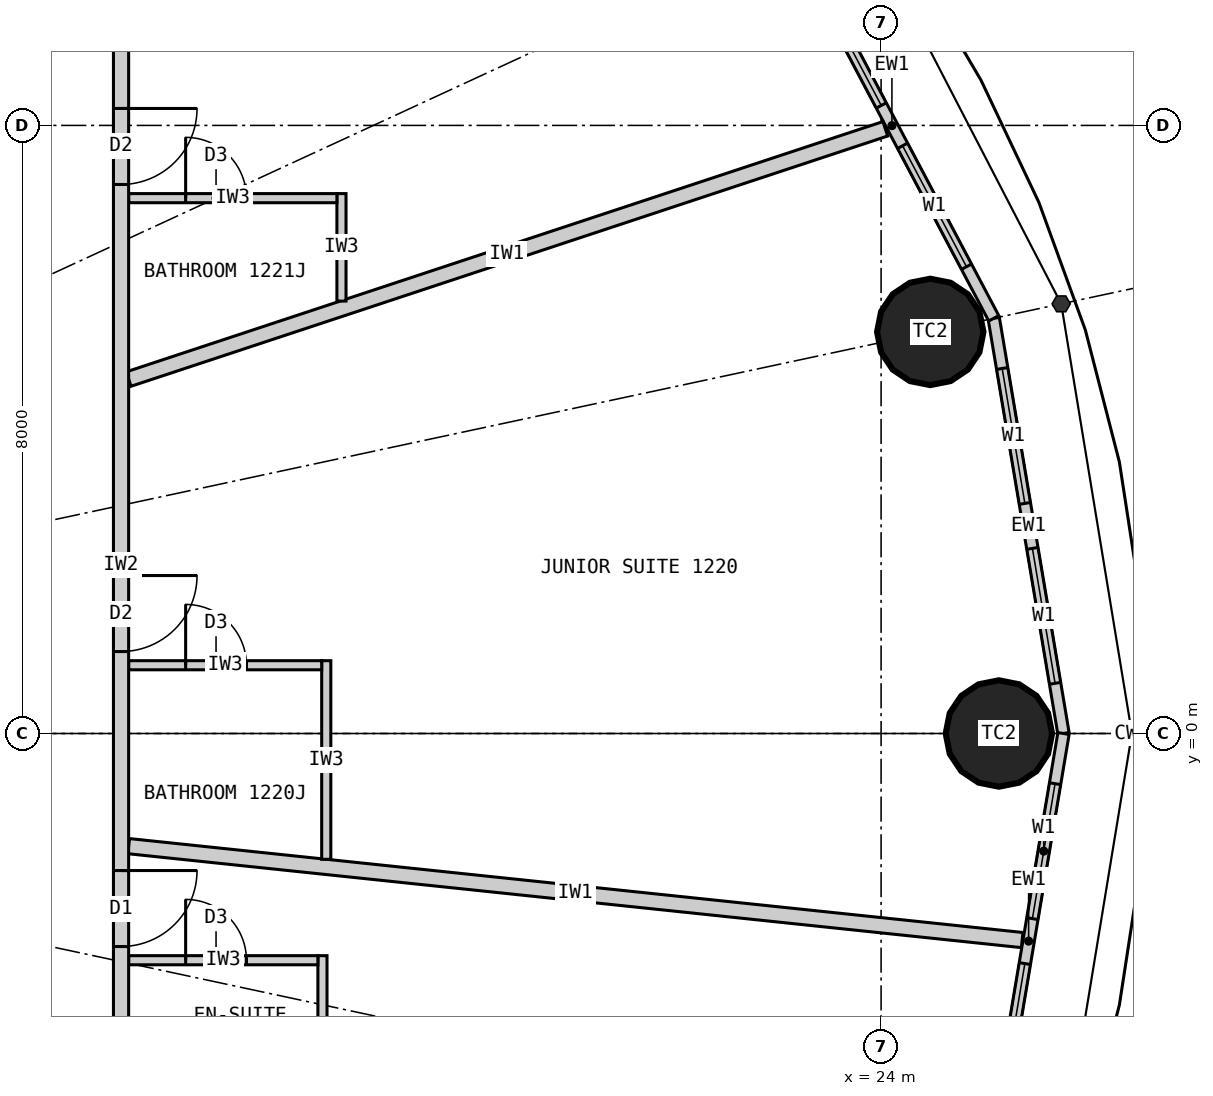
"""IFC4 building model, lengths in metres.
Left out: names, types, materials, properties, quantities, classifications, styles, units other than length and angle.
Written with IfcOpenShell. Run it as: python <this file> out.ifc"""

import sys

from ifc_helpers import new_model, si_unit, direction, frame, frame_2d, origin, origin_2d, place, context, subcontext, project, spatial, rectangle, circle, extrude, element, fill, save


model = new_model("IFC4")
c1 = context("Model", 3, precision=1e-05, world=origin(), true_north=direction((0.0, 1.0)))
c2 = subcontext(c1, "Body", "Model", "MODEL_VIEW")
j1 = project(units=[si_unit("LENGTHUNIT", "METRE"), si_unit("PLANEANGLEUNIT", "RADIAN")], contexts=[c1])
p1 = place(None, origin())
s1 = spatial("IfcSite", under=j1, at=p1, CompositionType="ELEMENT")
p2 = place(p1, origin())
s2 = spatial("IfcBuilding", under=s1, at=p2, CompositionType="ELEMENT")
p3 = place(p2, frame((0.0, 0.0, 54.0)))
s3 = spatial("IfcBuildingStorey", under=s2, at=p3, CompositionType="ELEMENT", Elevation=54.0)
for number, where, z_axis, x_axis in (
    (1, (25.55, 0.0, 0.0), (0.0, 0.0, 1.0), (1.0, 0.0, 0.0)),
    (2, (24.647, 5.283, 0.0), (0.0, 0.0, 1.0), (1.0, 0.0, 0.0)),
):
    element("IfcColumn", number, at=place(p3, frame(where, z_axis=z_axis, x_axis=x_axis)), inside=s3, PredefinedType="COLUMN", context=c2, shape_type="SweptSolid", body=[
        extrude(circle(Radius=0.7, at=origin_2d()), origin(), (0.0, 0.0, 1.0), 3.3),
    ])
p4 = place(p3, frame((26.4, 0.0, 0.0), z_axis=(0.0, 0.0, 1.0), x_axis=(-0.165642551694, 0.986185857264, 0.0)))
e3 = element("IfcWall", 3, at=p4, inside=s3, PredefinedType="ELEMENTEDWALL", context=c2, shape_type="SweptSolid", body=[
    extrude(rectangle(XDim=5.539, YDim=0.15, at=frame_2d((2.77, 0.0))), origin(), (0.0, 0.0, 1.0), 3.12),
])
p5 = place(p4, frame((0.669, 0.0, 0.9)))
e4 = element("IfcOpeningElement", 4, at=p5, cuts=e3, PredefinedType="OPENING", context=c2, shape_type="SweptSolid", body=[
    extrude(rectangle(XDim=1.8, YDim=1.9, at=frame_2d((0.9, 0.95))), frame((0.0, 0.085, 0.0), z_axis=(0.0, -1.0, 0.0), x_axis=(1.0, 0.0, 0.0)), (0.0, 0.0, 1.0), 0.17),
])
p6 = place(p4, frame((3.07, 0.0, 0.9)))
e5 = element("IfcOpeningElement", 5, at=p6, cuts=e3, PredefinedType="OPENING", context=c2, shape_type="SweptSolid", body=[
    extrude(rectangle(XDim=1.8, YDim=1.9, at=frame_2d((0.9, 0.95))), frame((0.0, 0.085, 0.0), z_axis=(0.0, -1.0, 0.0), x_axis=(1.0, 0.0, 0.0)), (0.0, 0.0, 1.0), 0.17),
])
p7 = place(p3, frame((25.482, 5.462, 0.0), z_axis=(0.0, 0.0, 1.0), x_axis=(-0.467296867008, 0.884100468321, 0.0)))
e6 = element("IfcWall", 6, at=p7, inside=s3, PredefinedType="ELEMENTEDWALL", context=c2, shape_type="SweptSolid", body=[
    extrude(rectangle(XDim=5.734, YDim=0.15, at=frame_2d((2.867, 0.0))), origin(), (0.0, 0.0, 1.0), 3.12),
])
p8 = place(p7, frame((0.767, 0.0, 0.9)))
e7 = element("IfcOpeningElement", 7, at=p8, cuts=e6, PredefinedType="OPENING", context=c2, shape_type="SweptSolid", body=[
    extrude(rectangle(XDim=1.8, YDim=1.9, at=frame_2d((0.9, 0.95))), frame((0.0, 0.085, 0.0), z_axis=(0.0, -1.0, 0.0), x_axis=(1.0, 0.0, 0.0)), (0.0, 0.0, 1.0), 0.17),
])
p9 = place(p7, frame((3.167, 0.0, 0.9)))
e8 = element("IfcOpeningElement", 8, at=p9, cuts=e6, PredefinedType="OPENING", context=c2, shape_type="SweptSolid", body=[
    extrude(rectangle(XDim=1.8, YDim=1.9, at=frame_2d((0.9, 0.95))), frame((0.0, 0.085, 0.0), z_axis=(0.0, -1.0, 0.0), x_axis=(1.0, 0.0, 0.0)), (0.0, 0.0, 1.0), 0.17),
])
p10 = place(p3, frame((25.482, -5.462, 0.0), z_axis=(0.0, 0.0, 1.0), x_axis=(0.165642551694, 0.986185857264, 0.0)))
e9 = element("IfcWall", 9, at=p10, inside=s3, PredefinedType="ELEMENTEDWALL", context=c2, shape_type="SweptSolid", body=[
    extrude(rectangle(XDim=5.539, YDim=0.15, at=frame_2d((2.77, 0.0))), origin(), (0.0, 0.0, 1.0), 3.12),
])
p11 = place(p10, frame((0.669, 0.0, 0.9)))
e10 = element("IfcOpeningElement", 10, at=p11, cuts=e9, PredefinedType="OPENING", context=c2, shape_type="SweptSolid", body=[
    extrude(rectangle(XDim=1.8, YDim=1.9, at=frame_2d((0.9, 0.95))), frame((0.0, 0.085, 0.0), z_axis=(0.0, -1.0, 0.0), x_axis=(1.0, 0.0, 0.0)), (0.0, 0.0, 1.0), 0.17),
])
p12 = place(p10, frame((3.07, 0.0, 0.9)))
e11 = element("IfcOpeningElement", 11, at=p12, cuts=e9, PredefinedType="OPENING", context=c2, shape_type="SweptSolid", body=[
    extrude(rectangle(XDim=1.8, YDim=1.9, at=frame_2d((0.9, 0.95))), frame((0.0, 0.085, 0.0), z_axis=(0.0, -1.0, 0.0), x_axis=(1.0, 0.0, 0.0)), (0.0, 0.0, 1.0), 0.17),
])
p13 = place(p3, frame((14.1, 4.663, 0.0), z_axis=(0.0, 0.0, 1.0), x_axis=(0.949432655039, 0.31397075269, 0.0)))
e12 = element("IfcWall", 12, at=p13, inside=s3, PredefinedType="PARTITIONING", context=c2, shape_type="SweptSolid", body=[
    extrude(rectangle(XDim=10.486, YDim=0.2, at=frame_2d((5.243, 0.0))), origin(), (0.0, 0.0, 1.0), 3.12),
])
p14 = place(p3, frame((14.1, -1.482, 0.0), z_axis=(0.0, 0.0, 1.0), x_axis=(0.994522076235, -0.104526742422, 0.0)))
e13 = element("IfcWall", 13, at=p14, inside=s3, PredefinedType="PARTITIONING", context=c2, shape_type="SweptSolid", body=[
    extrude(rectangle(XDim=11.821, YDim=0.2, at=frame_2d((5.91, 0.0))), origin(), (0.0, 0.0, 1.0), 2.32),
])
p15 = place(p3, frame((16.65, -5.406, 0.0), z_axis=(0.0, 0.0, 1.0), x_axis=(0.0, 1.0, 0.0)))
e14 = element("IfcWall", 14, at=p15, inside=s3, PredefinedType="PARTITIONING", context=c2, shape_type="SweptSolid", body=[
    extrude(rectangle(XDim=2.483, YDim=0.12, at=frame_2d((1.242, 0.0))), origin(), (0.0, 0.0, 1.0), 3.12),
])
p16 = place(p3, frame((14.1, -2.983, 0.0), z_axis=(0.0, 0.0, 1.0), x_axis=(1.0, 0.0, 0.0)))
e15 = element("IfcWall", 15, at=p16, inside=s3, PredefinedType="PARTITIONING", context=c2, shape_type="SweptSolid", body=[
    extrude(rectangle(XDim=2.49, YDim=0.12, at=frame_2d((1.245, 0.0))), origin(), (0.0, 0.0, 1.0), 3.12),
])
p17 = place(p16, frame((0.75, 0.0, 0.0)))
e16 = element("IfcOpeningElement", 16, at=p17, cuts=e15, PredefinedType="OPENING", context=c2, shape_type="SweptSolid", body=[
    extrude(rectangle(XDim=0.8, YDim=2.1, at=frame_2d((0.4, 1.05))), frame((0.0, 0.07, 0.0), z_axis=(0.0, -1.0, 0.0), x_axis=(1.0, 0.0, 0.0)), (0.0, 0.0, 1.0), 0.14),
])
p18 = place(p3, frame((16.7, -1.655, 0.0), z_axis=(0.0, 0.0, 1.0), x_axis=(0.0, 1.0, 0.0)))
e17 = element("IfcWall", 17, at=p18, inside=s3, PredefinedType="PARTITIONING", context=c2, shape_type="SweptSolid", body=[
    extrude(rectangle(XDim=2.613, YDim=0.12, at=frame_2d((1.307, 0.0))), origin(), (0.0, 0.0, 1.0), 3.12),
])
p19 = place(p3, frame((14.1, 0.898, 0.0), z_axis=(0.0, 0.0, 1.0), x_axis=(1.0, 0.0, 0.0)))
e18 = element("IfcWall", 18, at=p19, inside=s3, PredefinedType="PARTITIONING", context=c2, shape_type="SweptSolid", body=[
    extrude(rectangle(XDim=2.54, YDim=0.12, at=frame_2d((1.27, 0.0))), origin(), (0.0, 0.0, 1.0), 3.12),
])
p20 = place(p19, frame((0.75, 0.0, 0.0)))
e19 = element("IfcOpeningElement", 19, at=p20, cuts=e18, PredefinedType="OPENING", context=c2, shape_type="SweptSolid", body=[
    extrude(rectangle(XDim=0.8, YDim=2.1, at=frame_2d((0.4, 1.05))), frame((0.0, 0.07, 0.0), z_axis=(0.0, -1.0, 0.0), x_axis=(1.0, 0.0, 0.0)), (0.0, 0.0, 1.0), 0.14),
])
p21 = place(p3, frame((16.9, 5.689, 0.0), z_axis=(0.0, 0.0, 1.0), x_axis=(0.0, 1.0, 0.0)))
e20 = element("IfcWall", 20, at=p21, inside=s3, PredefinedType="PARTITIONING", context=c2, shape_type="SweptSolid", body=[
    extrude(rectangle(XDim=1.414, YDim=0.12, at=frame_2d((0.707, 0.0))), origin(), (0.0, 0.0, 1.0), 3.12),
])
p22 = place(p3, frame((14.1, 7.043, 0.0), z_axis=(0.0, 0.0, 1.0), x_axis=(1.0, 0.0, 0.0)))
e21 = element("IfcWall", 21, at=p22, inside=s3, PredefinedType="PARTITIONING", context=c2, shape_type="SweptSolid", body=[
    extrude(rectangle(XDim=2.74, YDim=0.12, at=frame_2d((1.37, 0.0))), origin(), (0.0, 0.0, 1.0), 3.12),
])
p23 = place(p22, frame((0.75, 0.0, 0.0)))
e22 = element("IfcOpeningElement", 22, at=p23, cuts=e21, PredefinedType="OPENING", context=c2, shape_type="SweptSolid", body=[
    extrude(rectangle(XDim=0.8, YDim=2.1, at=frame_2d((0.4, 1.05))), frame((0.0, 0.07, 0.0), z_axis=(0.0, -1.0, 0.0), x_axis=(1.0, 0.0, 0.0)), (0.0, 0.0, 1.0), 0.14),
])
p24 = place(p3, frame((14.0, -5.459, 0.0), z_axis=(0.0, 0.0, 1.0), x_axis=(0.0, 1.0, 0.0)))
e23 = element("IfcWall", 23, at=p24, inside=s3, PredefinedType="PARTITIONING", context=c2, shape_type="SweptSolid", body=[
    extrude(rectangle(XDim=15.359, YDim=0.2, at=frame_2d((7.679, 0.0))), origin(), (0.0, 0.0, 1.0), 3.12),
])
p25 = place(p24, frame((2.656, 0.0, 0.0)))
e24 = element("IfcOpeningElement", 24, at=p25, cuts=e23, PredefinedType="OPENING", context=c2, shape_type="SweptSolid", body=[
    extrude(rectangle(XDim=1.0, YDim=2.2, at=frame_2d((0.5, 1.1))), frame((0.0, 0.11, 0.0), z_axis=(0.0, -1.0, 0.0), x_axis=(1.0, 0.0, 0.0)), (0.0, 0.0, 1.0), 0.22),
])
p26 = place(p24, frame((6.537, 0.0, 0.0)))
e25 = element("IfcOpeningElement", 25, at=p26, cuts=e23, PredefinedType="OPENING", context=c2, shape_type="SweptSolid", body=[
    extrude(rectangle(XDim=1.0, YDim=2.2, at=frame_2d((0.5, 1.1))), frame((0.0, 0.11, 0.0), z_axis=(0.0, -1.0, 0.0), x_axis=(1.0, 0.0, 0.0)), (0.0, 0.0, 1.0), 0.22),
])
p27 = place(p24, frame((12.682, 0.0, 0.0)))
e26 = element("IfcOpeningElement", 26, at=p27, cuts=e23, PredefinedType="OPENING", context=c2, shape_type="SweptSolid", body=[
    extrude(rectangle(XDim=1.0, YDim=2.2, at=frame_2d((0.5, 1.1))), frame((0.0, 0.11, 0.0), z_axis=(0.0, -1.0, 0.0), x_axis=(1.0, 0.0, 0.0)), (0.0, 0.0, 1.0), 0.22),
])
p28 = place(p5, origin())
e27 = element("IfcWindow", 27, at=p28, inside=s3, PartitioningType="SINGLE_PANEL", PredefinedType="WINDOW", context=c2, shape_type="SweptSolid", body=[
    extrude(rectangle(XDim=1.8, YDim=1.9, at=frame_2d((0.9, 0.95))), frame((0.0, 0.03, 0.0), z_axis=(0.0, -1.0, 0.0), x_axis=(1.0, 0.0, 0.0)), (0.0, 0.0, 1.0), 0.06),
])
fill(e4, e27)
p29 = place(p6, origin())
e28 = element("IfcWindow", 28, at=p29, inside=s3, PartitioningType="SINGLE_PANEL", PredefinedType="WINDOW", context=c2, shape_type="SweptSolid", body=[
    extrude(rectangle(XDim=1.8, YDim=1.9, at=frame_2d((0.9, 0.95))), frame((0.0, 0.03, 0.0), z_axis=(0.0, -1.0, 0.0), x_axis=(1.0, 0.0, 0.0)), (0.0, 0.0, 1.0), 0.06),
])
fill(e5, e28)
p30 = place(p8, origin())
e29 = element("IfcWindow", 29, at=p30, inside=s3, PartitioningType="SINGLE_PANEL", PredefinedType="WINDOW", context=c2, shape_type="SweptSolid", body=[
    extrude(rectangle(XDim=1.8, YDim=1.9, at=frame_2d((0.9, 0.95))), frame((0.0, 0.03, 0.0), z_axis=(0.0, -1.0, 0.0), x_axis=(1.0, 0.0, 0.0)), (0.0, 0.0, 1.0), 0.06),
])
fill(e7, e29)
p31 = place(p9, origin())
e30 = element("IfcWindow", 30, at=p31, inside=s3, PartitioningType="SINGLE_PANEL", PredefinedType="WINDOW", context=c2, shape_type="SweptSolid", body=[
    extrude(rectangle(XDim=1.8, YDim=1.9, at=frame_2d((0.9, 0.95))), frame((0.0, 0.03, 0.0), z_axis=(0.0, -1.0, 0.0), x_axis=(1.0, 0.0, 0.0)), (0.0, 0.0, 1.0), 0.06),
])
fill(e8, e30)
p32 = place(p11, origin())
e31 = element("IfcWindow", 31, at=p32, inside=s3, PartitioningType="SINGLE_PANEL", PredefinedType="WINDOW", context=c2, shape_type="SweptSolid", body=[
    extrude(rectangle(XDim=1.8, YDim=1.9, at=frame_2d((0.9, 0.95))), frame((0.0, 0.03, 0.0), z_axis=(0.0, -1.0, 0.0), x_axis=(1.0, 0.0, 0.0)), (0.0, 0.0, 1.0), 0.06),
])
fill(e10, e31)
p33 = place(p12, origin())
e32 = element("IfcWindow", 32, at=p33, inside=s3, PartitioningType="SINGLE_PANEL", PredefinedType="WINDOW", context=c2, shape_type="SweptSolid", body=[
    extrude(rectangle(XDim=1.8, YDim=1.9, at=frame_2d((0.9, 0.95))), frame((0.0, 0.03, 0.0), z_axis=(0.0, -1.0, 0.0), x_axis=(1.0, 0.0, 0.0)), (0.0, 0.0, 1.0), 0.06),
])
fill(e11, e32)
p34 = place(p17, origin())
e33 = element("IfcDoor", 33, at=p34, inside=s3, OperationType="SINGLE_SWING_LEFT", PredefinedType="DOOR", context=c2, shape_type="SweptSolid", body=[
    extrude(rectangle(XDim=0.8, YDim=2.1, at=frame_2d((0.4, 1.05))), frame((0.0, 0.025, 0.0), z_axis=(0.0, -1.0, 0.0), x_axis=(1.0, 0.0, 0.0)), (0.0, 0.0, 1.0), 0.05),
])
fill(e16, e33)
p35 = place(p25, origin())
e34 = element("IfcDoor", 34, at=p35, inside=s3, OperationType="SINGLE_SWING_RIGHT", PredefinedType="DOOR", context=c2, shape_type="SweptSolid", body=[
    extrude(rectangle(XDim=1.0, YDim=2.2, at=frame_2d((0.5, 1.1))), frame((0.0, 0.025, 0.0), z_axis=(0.0, -1.0, 0.0), x_axis=(1.0, 0.0, 0.0)), (0.0, 0.0, 1.0), 0.05),
])
fill(e24, e34)
p36 = place(p20, origin())
e35 = element("IfcDoor", 35, at=p36, inside=s3, OperationType="SINGLE_SWING_LEFT", PredefinedType="DOOR", context=c2, shape_type="SweptSolid", body=[
    extrude(rectangle(XDim=0.8, YDim=2.1, at=frame_2d((0.4, 1.05))), frame((0.0, 0.025, 0.0), z_axis=(0.0, -1.0, 0.0), x_axis=(1.0, 0.0, 0.0)), (0.0, 0.0, 1.0), 0.05),
])
fill(e19, e35)
p37 = place(p26, origin())
e36 = element("IfcDoor", 36, at=p37, inside=s3, OperationType="SINGLE_SWING_RIGHT", PredefinedType="DOOR", context=c2, shape_type="SweptSolid", body=[
    extrude(rectangle(XDim=1.0, YDim=2.2, at=frame_2d((0.5, 1.1))), frame((0.0, 0.025, 0.0), z_axis=(0.0, -1.0, 0.0), x_axis=(1.0, 0.0, 0.0)), (0.0, 0.0, 1.0), 0.05),
])
fill(e25, e36)
p38 = place(p23, origin())
e37 = element("IfcDoor", 37, at=p38, inside=s3, OperationType="SINGLE_SWING_LEFT", PredefinedType="DOOR", context=c2, shape_type="SweptSolid", body=[
    extrude(rectangle(XDim=0.8, YDim=2.1, at=frame_2d((0.4, 1.05))), frame((0.0, 0.025, 0.0), z_axis=(0.0, -1.0, 0.0), x_axis=(1.0, 0.0, 0.0)), (0.0, 0.0, 1.0), 0.05),
])
fill(e22, e37)
p39 = place(p27, origin())
e38 = element("IfcDoor", 38, at=p39, inside=s3, OperationType="SINGLE_SWING_RIGHT", PredefinedType="DOOR", context=c2, shape_type="SweptSolid", body=[
    extrude(rectangle(XDim=1.0, YDim=2.2, at=frame_2d((0.5, 1.1))), frame((0.0, 0.025, 0.0), z_axis=(0.0, -1.0, 0.0), x_axis=(1.0, 0.0, 0.0)), (0.0, 0.0, 1.0), 0.05),
])
fill(e26, e38)
save(model, sys.argv[1])
